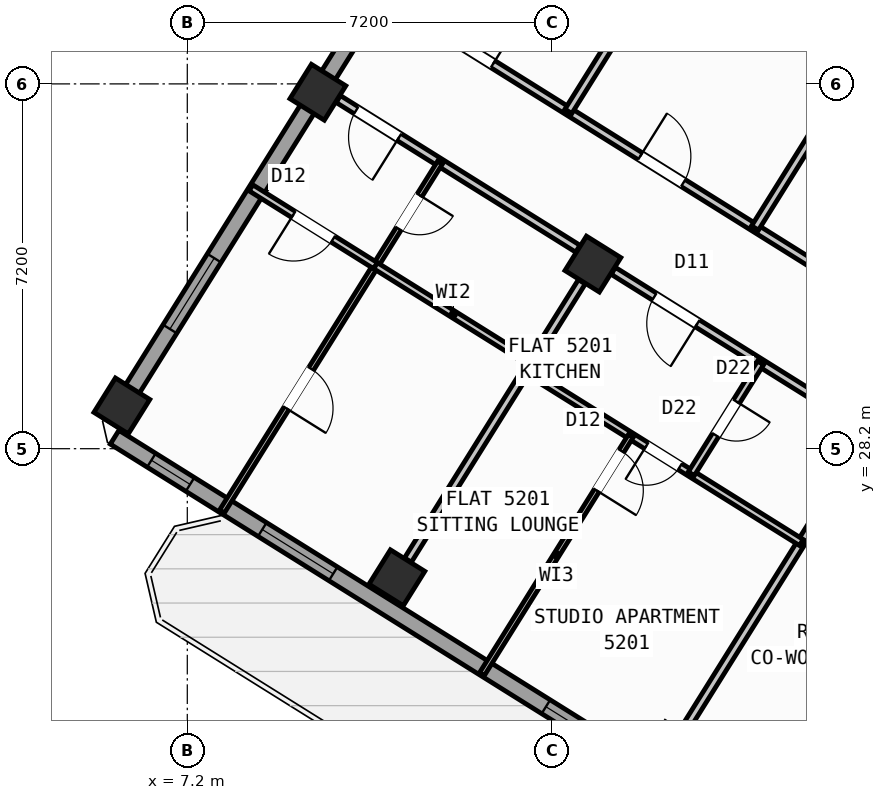
"""IFC4 building model, lengths in metres.
Left out: names, types, materials, properties, quantities, classifications, styles, units other than length and angle.
Written with IfcOpenShell. Run it as: python <this file> out.ifc"""

import sys

from ifc_helpers import new_model, si_unit, direction, frame, frame_2d, origin, origin_2d, place, context, subcontext, project, spatial, rectangle, hollow_rectangle, extrude, source, transform, mapped, element, fill, save


model = new_model("IFC4")
c1 = context("Model", 3, precision=1e-05, world=origin(), true_north=direction((0.0, 1.0)))
c2 = subcontext(c1, "Body", "Model", "MODEL_VIEW")
j1 = project(units=[si_unit("LENGTHUNIT", "METRE"), si_unit("PLANEANGLEUNIT", "RADIAN")], contexts=[c1])
p1 = place(None, origin())
s1 = spatial("IfcSite", under=j1, at=p1, CompositionType="ELEMENT")
p2 = place(p1, origin())
s2 = spatial("IfcBuilding", under=s1, at=p2, CompositionType="ELEMENT")
p3 = place(p2, frame((0.0, 0.0, 207.6)))
s3 = spatial("IfcBuildingStorey", under=s2, at=p3, CompositionType="ELEMENT", Elevation=207.6)
m1 = source(origin(), c2, "Body", "SweptSolid", [
    extrude(hollow_rectangle(XDim=0.8, YDim=0.8, WallThickness=0.032, at=origin_2d()), origin(), (0.0, 0.0, 1.0), 3.6),
])
for number, where, z_axis, x_axis in (
    (1, (15.205, 31.844, 0.0), (0.0, 0.0, 1.0), (-0.848, 0.53, 0.0)),
    (2, (11.336, 25.653, 0.0), (0.0, 0.0, 1.0), (-0.848, 0.53, 0.0)),
    (3, (9.777, 35.235, 0.0), (0.0, 0.0, 1.0), (-0.848, 0.53, 0.0)),
    (4, (5.909, 29.044, 0.0), (0.0, 0.0, 1.0), (-0.848, 0.53, 0.0)),
):
    element("IfcColumn", number, at=place(p3, frame(where, z_axis=z_axis, x_axis=x_axis)), inside=s3, PredefinedType="COLUMN", context=c2, shape_type="MappedRepresentation", body=[
        mapped(m1, transform((0.0, 0.0, 0.0), scale=1.0)),
    ])
p4 = place(p3, frame((31.76, 12.183, 0.0), z_axis=(0.0, 0.0, 1.0), x_axis=(-0.848047074256, 0.529920899612, 0.0)))
e5 = element("IfcWall", 5, at=p4, inside=s3, PredefinedType="STANDARD", context=c2, shape_type="SweptSolid", body=[
    extrude(rectangle(XDim=30.652, YDim=0.32, at=frame_2d((15.326, 0.0))), origin(), (0.0, 0.0, 1.0), 3.35),
])
p5 = place(p4, frame((15.166, 0.0, 0.0)))
e6 = element("IfcOpeningElement", 6, at=p5, cuts=e5, PredefinedType="OPENING", context=c2, shape_type="SweptSolid", body=[
    extrude(rectangle(XDim=1.2, YDim=2.15, at=frame_2d((0.6, 1.075))), frame((0.0, 0.17, 0.0), z_axis=(0.0, -1.0, 0.0), x_axis=(1.0, 0.0, 0.0)), (0.0, 0.0, 1.0), 0.34),
])
p6 = place(p4, frame((2.24, 0.0, 0.9)))
e7 = element("IfcOpeningElement", 7, at=p6, cuts=e5, PredefinedType="OPENING", context=c2, shape_type="SweptSolid", body=[
    extrude(rectangle(XDim=1.65, YDim=1.45, at=frame_2d((0.825, 0.725))), frame((0.0, 0.17, 0.0), z_axis=(0.0, -1.0, 0.0), x_axis=(1.0, 0.0, 0.0)), (0.0, 0.0, 1.0), 0.34),
])
p7 = place(p4, frame((7.469, 0.0, 0.9)))
e8 = element("IfcOpeningElement", 8, at=p7, cuts=e5, PredefinedType="OPENING", context=c2, shape_type="SweptSolid", body=[
    extrude(rectangle(XDim=1.65, YDim=1.45, at=frame_2d((0.825, 0.725))), frame((0.0, 0.17, 0.0), z_axis=(0.0, -1.0, 0.0), x_axis=(1.0, 0.0, 0.0)), (0.0, 0.0, 1.0), 0.34),
])
p8 = place(p4, frame((12.623, 0.0, 1.0)))
e9 = element("IfcOpeningElement", 9, at=p8, cuts=e5, PredefinedType="OPENING", context=c2, shape_type="SweptSolid", body=[
    extrude(rectangle(XDim=0.9, YDim=1.25, at=frame_2d((0.45, 0.625))), frame((0.0, 0.17, 0.0), z_axis=(0.0, -1.0, 0.0), x_axis=(1.0, 0.0, 0.0)), (0.0, 0.0, 1.0), 0.34),
])
p9 = place(p4, frame((19.715, 0.0, 1.0)))
e10 = element("IfcOpeningElement", 10, at=p9, cuts=e5, PredefinedType="OPENING", context=c2, shape_type="SweptSolid", body=[
    extrude(rectangle(XDim=0.9, YDim=1.25, at=frame_2d((0.45, 0.625))), frame((0.0, 0.17, 0.0), z_axis=(0.0, -1.0, 0.0), x_axis=(1.0, 0.0, 0.0)), (0.0, 0.0, 1.0), 0.34),
])
p10 = place(p4, frame((25.566, 0.0, 0.9)))
e11 = element("IfcOpeningElement", 11, at=p10, cuts=e5, PredefinedType="OPENING", context=c2, shape_type="SweptSolid", body=[
    extrude(rectangle(XDim=1.65, YDim=1.45, at=frame_2d((0.825, 0.725))), frame((0.0, 0.17, 0.0), z_axis=(0.0, -1.0, 0.0), x_axis=(1.0, 0.0, 0.0)), (0.0, 0.0, 1.0), 0.34),
])
p11 = place(p4, frame((28.896, 0.0, 1.0)))
e12 = element("IfcOpeningElement", 12, at=p11, cuts=e5, PredefinedType="OPENING", context=c2, shape_type="SweptSolid", body=[
    extrude(rectangle(XDim=0.9, YDim=1.25, at=frame_2d((0.45, 0.625))), frame((0.0, 0.17, 0.0), z_axis=(0.0, -1.0, 0.0), x_axis=(1.0, 0.0, 0.0)), (0.0, 0.0, 1.0), 0.34),
])
p12 = place(p3, frame((5.7, 28.71, 0.0), z_axis=(0.0, 0.0, 1.0), x_axis=(0.529923711467, 0.8480453172, 0.0)))
e13 = element("IfcWall", 13, at=p12, inside=s3, PredefinedType="STANDARD", context=c2, shape_type="SweptSolid", body=[
    extrude(rectangle(XDim=21.587, YDim=0.32, at=frame_2d((10.794, 0.0))), origin(), (0.0, 0.0, 1.0), 2.825),
])
p13 = place(p12, frame((2.184, 0.0, 0.9)))
e14 = element("IfcOpeningElement", 14, at=p13, cuts=e13, PredefinedType="OPENING", context=c2, shape_type="SweptSolid", body=[
    extrude(rectangle(XDim=1.65, YDim=1.45, at=frame_2d((0.825, 0.725))), frame((0.0, 0.17, 0.0), z_axis=(0.0, -1.0, 0.0), x_axis=(1.0, 0.0, 0.0)), (0.0, 0.0, 1.0), 0.34),
])
p14 = place(p12, frame((11.709, 0.0, 0.9)))
e15 = element("IfcOpeningElement", 15, at=p14, cuts=e13, PredefinedType="OPENING", context=c2, shape_type="SweptSolid", body=[
    extrude(rectangle(XDim=1.35, YDim=1.45, at=frame_2d((0.675, 0.725))), frame((0.0, 0.17, 0.0), z_axis=(0.0, -1.0, 0.0), x_axis=(1.0, 0.0, 0.0)), (0.0, 0.0, 1.0), 0.34),
])
p15 = place(p12, frame((17.181, 0.0, 0.95)))
e16 = element("IfcOpeningElement", 16, at=p15, cuts=e13, PredefinedType="OPENING", context=c2, shape_type="SweptSolid", body=[
    extrude(rectangle(XDim=1.95, YDim=1.35, at=frame_2d((0.975, 0.675))), frame((0.0, 0.17, 0.0), z_axis=(0.0, -1.0, 0.0), x_axis=(1.0, 0.0, 0.0)), (0.0, 0.0, 1.0), 0.34),
])
p16 = place(p3, frame((17.424, 47.083, 0.0), z_axis=(0.0, 0.0, 1.0), x_axis=(0.848049927979, -0.529916332693, 0.0)))
e17 = element("IfcWall", 17, at=p16, inside=s3, PredefinedType="STANDARD", context=c2, shape_type="SweptSolid", body=[
    extrude(rectangle(XDim=29.223, YDim=0.32, at=frame_2d((14.612, 0.0))), origin(), (0.0, 0.0, 1.0), 3.35),
])
p17 = place(p16, frame((2.526, 0.0, 0.0)))
e18 = element("IfcOpeningElement", 18, at=p17, cuts=e17, PredefinedType="OPENING", context=c2, shape_type="SweptSolid", body=[
    extrude(rectangle(XDim=1.05, YDim=2.15, at=frame_2d((0.525, 1.075))), frame((0.0, 0.17, 0.0), z_axis=(0.0, -1.0, 0.0), x_axis=(1.0, 0.0, 0.0)), (0.0, 0.0, 1.0), 0.34),
])
p18 = place(p16, frame((0.653, 0.0, 0.9)))
e19 = element("IfcOpeningElement", 19, at=p18, cuts=e17, PredefinedType="OPENING", context=c2, shape_type="SweptSolid", body=[
    extrude(rectangle(XDim=1.35, YDim=1.45, at=frame_2d((0.675, 0.725))), frame((0.0, 0.17, 0.0), z_axis=(0.0, -1.0, 0.0), x_axis=(1.0, 0.0, 0.0)), (0.0, 0.0, 1.0), 0.34),
])
p19 = place(p16, frame((6.897, 0.0, 1.0)))
e20 = element("IfcOpeningElement", 20, at=p19, cuts=e17, PredefinedType="OPENING", context=c2, shape_type="SweptSolid", body=[
    extrude(rectangle(XDim=0.9, YDim=1.25, at=frame_2d((0.45, 0.625))), frame((0.0, 0.17, 0.0), z_axis=(0.0, -1.0, 0.0), x_axis=(1.0, 0.0, 0.0)), (0.0, 0.0, 1.0), 0.34),
])
p20 = place(p16, frame((9.602, 0.0, 0.95)))
e21 = element("IfcOpeningElement", 21, at=p20, cuts=e17, PredefinedType="OPENING", context=c2, shape_type="SweptSolid", body=[
    extrude(rectangle(XDim=1.95, YDim=1.35, at=frame_2d((0.975, 0.675))), frame((0.0, 0.17, 0.0), z_axis=(0.0, -1.0, 0.0), x_axis=(1.0, 0.0, 0.0)), (0.0, 0.0, 1.0), 0.34),
])
p21 = place(p16, frame((14.096, 0.0, 1.0)))
e22 = element("IfcOpeningElement", 22, at=p21, cuts=e17, PredefinedType="OPENING", context=c2, shape_type="SweptSolid", body=[
    extrude(rectangle(XDim=0.9, YDim=1.25, at=frame_2d((0.45, 0.625))), frame((0.0, 0.17, 0.0), z_axis=(0.0, -1.0, 0.0), x_axis=(1.0, 0.0, 0.0)), (0.0, 0.0, 1.0), 0.34),
])
p22 = place(p16, frame((17.254, 0.0, 1.0)))
e23 = element("IfcOpeningElement", 23, at=p22, cuts=e17, PredefinedType="OPENING", context=c2, shape_type="SweptSolid", body=[
    extrude(rectangle(XDim=0.9, YDim=1.25, at=frame_2d((0.45, 0.625))), frame((0.0, 0.17, 0.0), z_axis=(0.0, -1.0, 0.0), x_axis=(1.0, 0.0, 0.0)), (0.0, 0.0, 1.0), 0.34),
])
p23 = place(p16, frame((21.139, 0.0, 0.9)))
e24 = element("IfcOpeningElement", 24, at=p23, cuts=e17, PredefinedType="OPENING", context=c2, shape_type="SweptSolid", body=[
    extrude(rectangle(XDim=1.35, YDim=1.45, at=frame_2d((0.675, 0.725))), frame((0.0, 0.17, 0.0), z_axis=(0.0, -1.0, 0.0), x_axis=(1.0, 0.0, 0.0)), (0.0, 0.0, 1.0), 0.34),
])
p24 = place(p16, frame((25.778, 0.0, 0.9)))
e25 = element("IfcOpeningElement", 25, at=p24, cuts=e17, PredefinedType="OPENING", context=c2, shape_type="SweptSolid", body=[
    extrude(rectangle(XDim=1.35, YDim=1.45, at=frame_2d((0.675, 0.725))), frame((0.0, 0.17, 0.0), z_axis=(0.0, -1.0, 0.0), x_axis=(1.0, 0.0, 0.0)), (0.0, 0.0, 1.0), 0.34),
])
p25 = place(p3, frame((25.065, 28.394, 0.0), z_axis=(0.0, 0.0, 1.0), x_axis=(-0.848048310262, 0.529918921593, 0.0)))
e26 = element("IfcWall", 26, at=p25, inside=s3, PredefinedType="PARTITIONING", context=c2, shape_type="SweptSolid", body=[
    extrude(rectangle(XDim=16.73, YDim=0.16, at=frame_2d((8.365, 0.0))), origin(), (0.0, 0.0, 1.0), 3.34),
])
p26 = place(p25, frame((1.338, 0.0, 0.0)))
e27 = element("IfcOpeningElement", 27, at=p26, cuts=e26, PredefinedType="OPENING", context=c2, shape_type="SweptSolid", body=[
    extrude(rectangle(XDim=1.0, YDim=2.1, at=frame_2d((0.5, 1.05))), frame((0.0, 0.09, 0.0), z_axis=(0.0, -1.0, 0.0), x_axis=(1.0, 0.0, 0.0)), (0.0, 0.0, 1.0), 0.18),
])
p27 = place(p25, frame((5.265, 0.0, 0.0)))
e28 = element("IfcOpeningElement", 28, at=p27, cuts=e26, PredefinedType="OPENING", context=c2, shape_type="SweptSolid", body=[
    extrude(rectangle(XDim=1.0, YDim=2.1, at=frame_2d((0.5, 1.05))), frame((0.0, 0.09, 0.0), z_axis=(0.0, -1.0, 0.0), x_axis=(1.0, 0.0, 0.0)), (0.0, 0.0, 1.0), 0.18),
])
p28 = place(p25, frame((9.526, 0.0, 0.0)))
e29 = element("IfcOpeningElement", 29, at=p28, cuts=e26, PredefinedType="OPENING", context=c2, shape_type="SweptSolid", body=[
    extrude(rectangle(XDim=1.0, YDim=2.1, at=frame_2d((0.5, 1.05))), frame((0.0, 0.09, 0.0), z_axis=(0.0, -1.0, 0.0), x_axis=(1.0, 0.0, 0.0)), (0.0, 0.0, 1.0), 0.18),
])
p29 = place(p25, frame((13.954, 0.0, 0.0)))
e30 = element("IfcOpeningElement", 30, at=p29, cuts=e26, PredefinedType="OPENING", context=c2, shape_type="SweptSolid", body=[
    extrude(rectangle(XDim=1.0, YDim=2.1, at=frame_2d((0.5, 1.05))), frame((0.0, 0.09, 0.0), z_axis=(0.0, -1.0, 0.0), x_axis=(1.0, 0.0, 0.0)), (0.0, 0.0, 1.0), 0.18),
])
p30 = place(p3, frame((20.336, 28.755, 0.0), z_axis=(0.0, 0.0, 1.0), x_axis=(-0.848049955116, 0.529916289265, 0.0)))
e31 = element("IfcWall", 31, at=p30, inside=s3, PredefinedType="PARTITIONING", context=c2, shape_type="SweptSolid", body=[
    extrude(rectangle(XDim=5.576, YDim=0.16, at=frame_2d((2.788, 0.0))), origin(), (0.0, 0.0, 1.0), 2.825),
])
p31 = place(p30, frame((3.618, 0.0, 0.0)))
e32 = element("IfcOpeningElement", 32, at=p31, cuts=e31, PredefinedType="OPENING", context=c2, shape_type="SweptSolid", body=[
    extrude(rectangle(XDim=1.0, YDim=2.1, at=frame_2d((0.5, 1.05))), frame((0.0, 0.09, 0.0), z_axis=(0.0, -1.0, 0.0), x_axis=(1.0, 0.0, 0.0)), (0.0, 0.0, 1.0), 0.18),
])
p32 = place(p3, frame((14.908, 32.147, 0.0), z_axis=(0.0, 0.0, 1.0), x_axis=(-0.848049955116, 0.529916289265, 0.0)))
e33 = element("IfcWall", 33, at=p32, inside=s3, PredefinedType="PARTITIONING", context=c2, shape_type="SweptSolid", body=[
    extrude(rectangle(XDim=5.576, YDim=0.16, at=frame_2d((2.788, 0.0))), origin(), (0.0, 0.0, 1.0), 2.825),
])
p33 = place(p32, frame((4.158, 0.0, 0.0)))
e34 = element("IfcOpeningElement", 34, at=p33, cuts=e33, PredefinedType="OPENING", context=c2, shape_type="SweptSolid", body=[
    extrude(rectangle(XDim=1.0, YDim=2.1, at=frame_2d((0.5, 1.05))), frame((0.0, 0.09, 0.0), z_axis=(0.0, -1.0, 0.0), x_axis=(1.0, 0.0, 0.0)), (0.0, 0.0, 1.0), 0.18),
])
p34 = place(p3, frame((20.414, 28.103, 0.0), z_axis=(0.0, 0.0, 1.0), x_axis=(-0.529934553702, -0.848038542045, 0.0)))
e35 = element("IfcWall", 35, at=p34, inside=s3, PredefinedType="PARTITIONING", context=c2, shape_type="SweptSolid", body=[
    extrude(rectangle(XDim=6.476, YDim=0.16, at=frame_2d((3.238, 0.0))), origin(), (0.0, 0.0, 1.0), 2.825),
])
p35 = place(p3, frame((14.986, 31.494, 0.0), z_axis=(0.0, 0.0, 1.0), x_axis=(-0.529907440938, -0.848055484057, 0.0)))
e36 = element("IfcWall", 36, at=p35, inside=s3, PredefinedType="PARTITIONING", context=c2, shape_type="SweptSolid", body=[
    extrude(rectangle(XDim=6.476, YDim=0.16, at=frame_2d((3.238, 0.0))), origin(), (0.0, 0.0, 1.0), 2.825),
])
p36 = place(p3, frame((19.318, 26.349, 0.0), z_axis=(0.0, 0.0, 1.0), x_axis=(-0.848039019877, 0.529933789039, 0.0)))
e37 = element("IfcWall", 37, at=p36, inside=s3, PredefinedType="PLUMBINGWALL", context=c2, shape_type="SweptSolid", body=[
    extrude(rectangle(XDim=6.4, YDim=0.14, at=frame_2d((3.2, 0.0))), origin(), (0.0, 0.0, 1.0), 3.34),
])
p37 = place(p36, frame((2.824, 0.0, 0.0)))
e38 = element("IfcOpeningElement", 38, at=p37, cuts=e37, PredefinedType="OPENING", context=c2, shape_type="SweptSolid", body=[
    extrude(rectangle(XDim=0.78, YDim=2.05, at=frame_2d((0.39, 1.025))), frame((0.0, 0.08, 0.0), z_axis=(0.0, -1.0, 0.0), x_axis=(1.0, 0.0, 0.0)), (0.0, 0.0, 1.0), 0.16),
])
p38 = place(p3, frame((18.514, 29.894, 0.0), z_axis=(0.0, 0.0, 1.0), x_axis=(-0.529913878929, -0.848051461244, 0.0)))
e39 = element("IfcWall", 39, at=p38, inside=s3, PredefinedType="PLUMBINGWALL", context=c2, shape_type="SweptSolid", body=[
    extrude(rectangle(XDim=2.58, YDim=0.14, at=frame_2d((1.29, 0.0))), origin(), (0.0, 0.0, 1.0), 3.34),
])
p39 = place(p38, frame((0.9, 0.0, 0.0)))
e40 = element("IfcOpeningElement", 40, at=p39, cuts=e39, PredefinedType="OPENING", context=c2, shape_type="SweptSolid", body=[
    extrude(rectangle(XDim=0.78, YDim=2.05, at=frame_2d((0.39, 1.025))), frame((0.0, 0.08, 0.0), z_axis=(0.0, -1.0, 0.0), x_axis=(1.0, 0.0, 0.0)), (0.0, 0.0, 1.0), 0.16),
])
p40 = place(p3, frame((15.953, 28.452, 0.0), z_axis=(0.0, 0.0, 1.0), x_axis=(-0.529919714018, -0.848047815099, 0.0)))
e41 = element("IfcWall", 41, at=p40, inside=s3, PredefinedType="PARTITIONING", context=c2, shape_type="SweptSolid", body=[
    extrude(rectangle(XDim=5.54, YDim=0.11, at=frame_2d((2.77, 0.0))), origin(), (0.0, 0.0, 1.0), 3.34),
])
p41 = place(p40, frame((0.35, 0.0, 0.0)))
e42 = element("IfcOpeningElement", 42, at=p41, cuts=e41, PredefinedType="OPENING", context=c2, shape_type="SweptSolid", body=[
    extrude(rectangle(XDim=0.92, YDim=2.08, at=frame_2d((0.46, 1.04))), frame((0.0, 0.065, 0.0), z_axis=(0.0, -1.0, 0.0), x_axis=(1.0, 0.0, 0.0)), (0.0, 0.0, 1.0), 0.13),
])
p42 = place(p3, frame((12.188, 33.847, 0.0), z_axis=(0.0, 0.0, 1.0), x_axis=(-0.529917860021, -0.848048973604, 0.0)))
e43 = element("IfcWall", 43, at=p42, inside=s3, PredefinedType="PARTITIONING", context=c2, shape_type="SweptSolid", body=[
    extrude(rectangle(XDim=8.12, YDim=0.11, at=frame_2d((4.06, 0.0))), origin(), (0.0, 0.0, 1.0), 3.34),
])
p43 = place(p42, frame((0.76, 0.0, 0.0)))
e44 = element("IfcOpeningElement", 44, at=p43, cuts=e43, PredefinedType="OPENING", context=c2, shape_type="SweptSolid", body=[
    extrude(rectangle(XDim=0.78, YDim=2.05, at=frame_2d((0.39, 1.025))), frame((0.0, 0.065, 0.0), z_axis=(0.0, -1.0, 0.0), x_axis=(1.0, 0.0, 0.0)), (0.0, 0.0, 1.0), 0.13),
])
p44 = place(p42, frame((4.8, 0.0, 0.0)))
e45 = element("IfcOpeningElement", 45, at=p44, cuts=e43, PredefinedType="OPENING", context=c2, shape_type="SweptSolid", body=[
    extrude(rectangle(XDim=0.92, YDim=2.08, at=frame_2d((0.46, 1.04))), frame((0.0, 0.065, 0.0), z_axis=(0.0, -1.0, 0.0), x_axis=(1.0, 0.0, 0.0)), (0.0, 0.0, 1.0), 0.13),
])
p45 = place(p3, frame((10.916, 31.811, 0.0), z_axis=(0.0, 0.0, 1.0), x_axis=(-0.84802195137, 0.529961102341, 0.0)))
e46 = element("IfcWall", 46, at=p45, inside=s3, PredefinedType="PLUMBINGWALL", context=c2, shape_type="SweptSolid", body=[
    extrude(rectangle(XDim=2.9, YDim=0.14, at=frame_2d((1.45, 0.0))), origin(), (0.0, 0.0, 1.0), 3.34),
])
p46 = place(p45, frame((0.99, 0.0, 0.0)))
e47 = element("IfcOpeningElement", 47, at=p46, cuts=e46, PredefinedType="OPENING", context=c2, shape_type="SweptSolid", body=[
    extrude(rectangle(XDim=0.92, YDim=2.08, at=frame_2d((0.46, 1.04))), frame((0.0, 0.08, 0.0), z_axis=(0.0, -1.0, 0.0), x_axis=(1.0, 0.0, 0.0)), (0.0, 0.0, 1.0), 0.16),
])
p47 = place(p3, frame((13.986, 29.893, 0.0), z_axis=(0.0, 0.0, 1.0), x_axis=(-0.848051346257, 0.52991406295, 0.0)))
e48 = element("IfcWall", 48, at=p47, inside=s3, PredefinedType="PLUMBINGWALL", context=c2, shape_type="SweptSolid", body=[
    extrude(rectangle(XDim=3.62, YDim=0.14, at=frame_2d((1.81, 0.0))), origin(), (0.0, 0.0, 1.0), 3.34),
])
for number, where, z_axis, x_axis in (
    (49, (24.578, 42.436, 0.0), (0.0, 0.0, 1.0), (-0.53, -0.848, 0.0)),
    (50, (20.894, 44.738, 0.0), (0.0, 0.0, 1.0), (-0.53, -0.848, 0.0)),
):
    element("IfcWall", number, at=place(p3, frame(where, z_axis=z_axis, x_axis=x_axis)), inside=s3, PredefinedType="PARTITIONING", context=c2, shape_type="SweptSolid", body=[
        extrude(rectangle(XDim=11.65, YDim=0.16, at=frame_2d((5.825, 0.0))), origin(), (0.0, 0.0, 1.0), 2.995),
    ])
m2 = source(origin(), c2, "Body", "SweptSolid", [
    extrude(rectangle(XDim=0.9, YDim=1.25, at=frame_2d((0.45, 0.625))), frame((0.0, 0.03, 0.0), z_axis=(0.0, -1.0, 0.0), x_axis=(1.0, 0.0, 0.0)), (0.0, 0.0, 1.0), 0.06),
])
p48 = place(p9, origin())
e51 = element("IfcWindow", 51, at=p48, inside=s3, PartitioningType="SINGLE_PANEL", PredefinedType="WINDOW", context=c2, shape_type="MappedRepresentation", body=[
    mapped(m2, transform((0.0, 0.0, 0.0), scale=1.0)),
])
fill(e10, e51)
m3 = source(origin(), c2, "Body", "SweptSolid", [
    extrude(rectangle(XDim=1.65, YDim=1.45, at=frame_2d((0.825, 0.725))), frame((0.0, 0.03, 0.0), z_axis=(0.0, -1.0, 0.0), x_axis=(1.0, 0.0, 0.0)), (0.0, 0.0, 1.0), 0.06),
])
p49 = place(p10, origin())
e52 = element("IfcWindow", 52, at=p49, inside=s3, PartitioningType="SINGLE_PANEL", PredefinedType="WINDOW", context=c2, shape_type="MappedRepresentation", body=[
    mapped(m3, transform((0.0, 0.0, 0.0), scale=1.0)),
])
fill(e11, e52)
p50 = place(p11, origin())
e53 = element("IfcWindow", 53, at=p50, inside=s3, PartitioningType="SINGLE_PANEL", PredefinedType="WINDOW", context=c2, shape_type="MappedRepresentation", body=[
    mapped(m2, transform((0.0, 0.0, 0.0), scale=1.0)),
])
fill(e12, e53)
p51 = place(p13, origin())
e54 = element("IfcWindow", 54, at=p51, inside=s3, PartitioningType="SINGLE_PANEL", PredefinedType="WINDOW", context=c2, shape_type="MappedRepresentation", body=[
    mapped(m3, transform((0.0, 0.0, 0.0), scale=1.0)),
])
fill(e14, e54)
m4 = source(origin(), c2, "Body", "SweptSolid", [
    extrude(rectangle(XDim=0.92, YDim=2.08, at=frame_2d((0.46, 1.04))), frame((0.0, 0.025, 0.0), z_axis=(0.0, -1.0, 0.0), x_axis=(1.0, 0.0, 0.0)), (0.0, 0.0, 1.0), 0.05),
])
p52 = place(p41, origin())
e55 = element("IfcDoor", 55, at=p52, inside=s3, OperationType="SINGLE_SWING_RIGHT", PredefinedType="DOOR", context=c2, shape_type="MappedRepresentation", body=[
    mapped(m4, transform((0.0, 0.0, 0.0), scale=1.0)),
])
fill(e42, e55)
m5 = source(origin(), c2, "Body", "SweptSolid", [
    extrude(rectangle(XDim=1.0, YDim=2.1, at=frame_2d((0.5, 1.05))), frame((0.0, 0.025, 0.0), z_axis=(0.0, -1.0, 0.0), x_axis=(1.0, 0.0, 0.0)), (0.0, 0.0, 1.0), 0.05),
])
p53 = place(p31, origin())
e56 = element("IfcDoor", 56, at=p53, inside=s3, OperationType="SINGLE_SWING_LEFT", PredefinedType="DOOR", context=c2, shape_type="MappedRepresentation", body=[
    mapped(m5, transform((0.0, 0.0, 0.0), scale=1.0)),
])
fill(e32, e56)
m6 = source(origin(), c2, "Body", "SweptSolid", [
    extrude(rectangle(XDim=0.78, YDim=2.05, at=frame_2d((0.39, 1.025))), frame((0.0, 0.025, 0.0), z_axis=(0.0, -1.0, 0.0), x_axis=(1.0, 0.0, 0.0)), (0.0, 0.0, 1.0), 0.05),
])
p54 = place(p37, origin())
e57 = element("IfcDoor", 57, at=p54, inside=s3, OperationType="SINGLE_SWING_RIGHT", PredefinedType="DOOR", context=c2, shape_type="MappedRepresentation", body=[
    mapped(m6, transform((0.0, 0.0, 0.0), scale=1.0)),
])
fill(e38, e57)
p55 = place(p39, origin())
e58 = element("IfcDoor", 58, at=p55, inside=s3, OperationType="SINGLE_SWING_LEFT", PredefinedType="DOOR", context=c2, shape_type="MappedRepresentation", body=[
    mapped(m6, transform((0.0, 0.0, 0.0), scale=1.0)),
])
fill(e40, e58)
p56 = place(p33, origin())
e59 = element("IfcDoor", 59, at=p56, inside=s3, OperationType="SINGLE_SWING_LEFT", PredefinedType="DOOR", context=c2, shape_type="MappedRepresentation", body=[
    mapped(m5, transform((0.0, 0.0, 0.0), scale=1.0)),
])
fill(e34, e59)
p57 = place(p46, origin())
e60 = element("IfcDoor", 60, at=p57, inside=s3, OperationType="SINGLE_SWING_RIGHT", PredefinedType="DOOR", context=c2, shape_type="MappedRepresentation", body=[
    mapped(m4, transform((0.0, 0.0, 0.0), scale=1.0)),
])
fill(e47, e60)
p58 = place(p43, origin())
e61 = element("IfcDoor", 61, at=p58, inside=s3, OperationType="SINGLE_SWING_LEFT", PredefinedType="DOOR", context=c2, shape_type="MappedRepresentation", body=[
    mapped(m6, transform((0.0, 0.0, 0.0), scale=1.0)),
])
fill(e44, e61)
p59 = place(p44, origin())
e62 = element("IfcDoor", 62, at=p59, inside=s3, OperationType="SINGLE_SWING_RIGHT", PredefinedType="DOOR", context=c2, shape_type="MappedRepresentation", body=[
    mapped(m4, transform((0.0, 0.0, 0.0), scale=1.0)),
])
fill(e45, e62)
p60 = place(p28, frame((1.0, 0.0, 0.0), z_axis=(0.0, 0.0, 1.0), x_axis=(-1.0, 0.0, 0.0)))
e63 = element("IfcDoor", 63, at=p60, inside=s3, OperationType="SINGLE_SWING_LEFT", PredefinedType="DOOR", context=c2, shape_type="MappedRepresentation", body=[
    mapped(m5, transform((0.0, 0.0, 0.0), scale=1.0)),
])
fill(e29, e63)
p61 = place(p29, frame((1.0, 0.0, 0.0), z_axis=(0.0, 0.0, 1.0), x_axis=(-1.0, 0.0, 0.0)))
e64 = element("IfcDoor", 64, at=p61, inside=s3, OperationType="SINGLE_SWING_RIGHT", PredefinedType="DOOR", context=c2, shape_type="MappedRepresentation", body=[
    mapped(m5, transform((0.0, 0.0, 0.0), scale=1.0)),
])
fill(e30, e64)
save(model, sys.argv[1])
